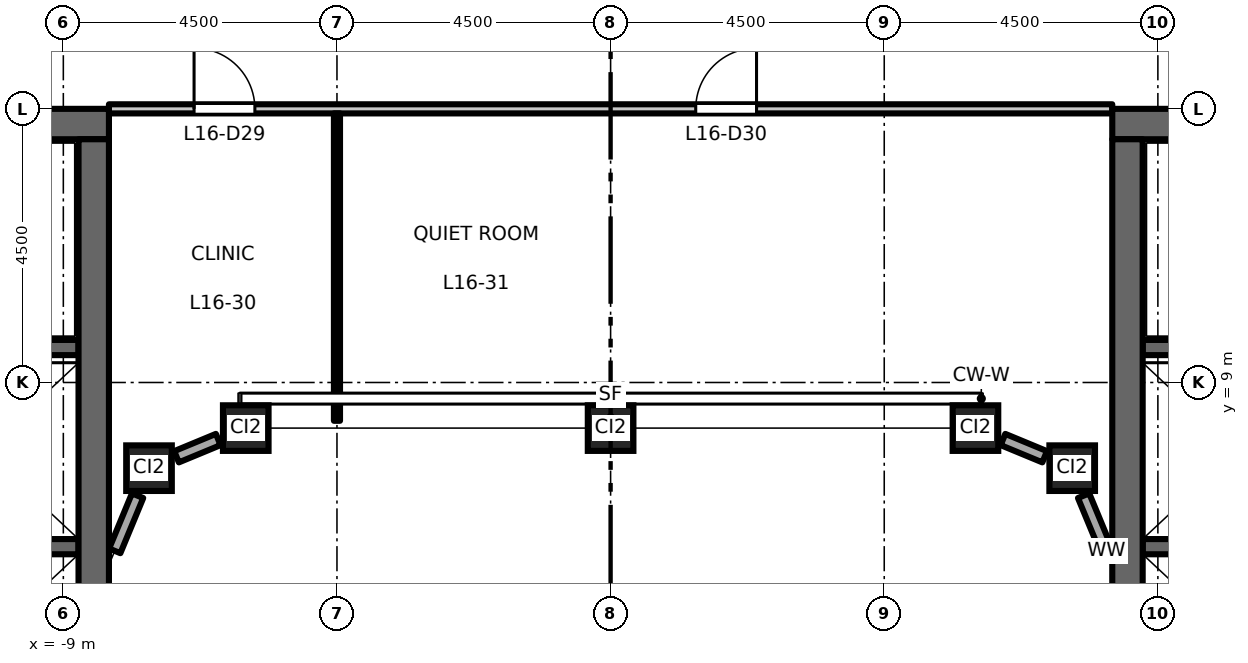
"""IFC4 building model, lengths in metres.
Left out: names, types, materials, properties, quantities, classifications, styles, units other than length and angle.
Written with IfcOpenShell. Run it as: python <this file> out.ifc"""

import sys

from ifc_helpers import new_model, si_unit, direction, frame, frame_2d, origin, origin_2d, place, context, subcontext, project, spatial, rectangle, hollow_rectangle, extrude, element, fill, save


model = new_model("IFC4")
c1 = context("Model", 3, precision=1e-05, world=origin(), true_north=direction((0.0, 1.0)))
c2 = subcontext(c1, "Body", "Model", "MODEL_VIEW")
j1 = project(units=[si_unit("LENGTHUNIT", "METRE"), si_unit("PLANEANGLEUNIT", "RADIAN")], contexts=[c1])
p1 = place(None, origin())
s1 = spatial("IfcSite", under=j1, at=p1, CompositionType="ELEMENT")
p2 = place(p1, origin())
s2 = spatial("IfcBuilding", under=s1, at=p2, CompositionType="ELEMENT")
p3 = place(p2, frame((0.0, 0.0, 76.2)))
s3 = spatial("IfcBuildingStorey", under=s2, at=p3, CompositionType="ELEMENT", Elevation=76.2)
for number, where, z_axis, x_axis in (
    (1, (-7.591, 7.591, 0.0), (0.0, 0.0, 1.0), (1.0, 0.0, 0.0)),
    (2, (-6.0, 8.25, 0.0), (0.0, 0.0, 1.0), (1.0, 0.0, 0.0)),
    (3, (0.0, 8.25, 0.0), (0.0, 0.0, 1.0), (1.0, 0.0, 0.0)),
    (4, (6.0, 8.25, 0.0), (0.0, 0.0, 1.0), (1.0, 0.0, 0.0)),
    (5, (7.591, 7.591, 0.0), (0.0, 0.0, 1.0), (1.0, 0.0, 0.0)),
):
    element("IfcColumn", number, at=place(p3, frame(where, z_axis=z_axis, x_axis=x_axis)), inside=s3, PredefinedType="COLUMN", context=c2, shape_type="SweptSolid", body=[
        extrude(hollow_rectangle(XDim=0.75, YDim=0.75, WallThickness=0.045, at=origin_2d()), origin(), (0.0, 0.0, 1.0), 4.5),
    ])
p4 = place(p3, frame((-8.75, 6.3, 0.0), z_axis=(0.0, 0.0, 1.0), x_axis=(-1.0, 0.0, 0.0)))
e6 = element("IfcWall", 6, at=p4, inside=s3, PredefinedType="SHEAR", context=c2, shape_type="SweptSolid", body=[
    extrude(rectangle(XDim=3.1, YDim=0.25, at=frame_2d((1.55, 0.0))), origin(), (0.0, 0.0, 1.0), 4.35),
])
p5 = place(p3, frame((-8.75, 9.575, 0.0), z_axis=(0.0, 0.0, 1.0), x_axis=(-1.0, 0.0, 0.0)))
e7 = element("IfcWall", 7, at=p5, inside=s3, PredefinedType="SHEAR", context=c2, shape_type="SweptSolid", body=[
    extrude(rectangle(XDim=8.0, YDim=0.25, at=frame_2d((4.0, 0.0))), origin(), (0.0, 0.0, 1.0), 4.35),
])
p6 = place(p5, frame((6.65, 0.0, 0.0)))
e8 = element("IfcOpeningElement", 8, at=p6, cuts=e7, PredefinedType="OPENING", context=c2, shape_type="SweptSolid", body=[
    extrude(rectangle(XDim=1.1, YDim=2.1, at=frame_2d((0.55, 1.05))), frame((0.0, 0.135, 0.0), z_axis=(0.0, -1.0, 0.0), x_axis=(1.0, 0.0, 0.0)), (0.0, 0.0, 1.0), 0.27),
])
p7 = place(p3, frame((-8.25, 13.25, 0.0), z_axis=(0.0, 0.0, 1.0), x_axis=(-1.0, 0.0, 0.0)))
e9 = element("IfcWall", 9, at=p7, inside=s3, PredefinedType="SHEAR", context=c2, shape_type="SweptSolid", body=[
    extrude(rectangle(XDim=13.5, YDim=0.5, at=frame_2d((6.75, 0.0))), origin(), (0.0, 0.0, 1.0), 4.35),
])
p8 = place(p3, frame((-8.5, -13.0, 0.0), z_axis=(0.0, 0.0, 1.0), x_axis=(0.0, 1.0, 0.0)))
e10 = element("IfcWall", 10, at=p8, inside=s3, PredefinedType="SHEAR", context=c2, shape_type="SweptSolid", body=[
    extrude(rectangle(XDim=26.0, YDim=0.5, at=frame_2d((13.0, 0.0))), origin(), (0.0, 0.0, 1.0), 4.35),
])
p9 = place(p3, frame((8.75, 6.3, 0.0), z_axis=(0.0, 0.0, 1.0), x_axis=(1.0, 0.0, 0.0)))
e11 = element("IfcWall", 11, at=p9, inside=s3, PredefinedType="SHEAR", context=c2, shape_type="SweptSolid", body=[
    extrude(rectangle(XDim=3.1, YDim=0.25, at=frame_2d((1.55, 0.0))), origin(), (0.0, 0.0, 1.0), 4.35),
])
p10 = place(p3, frame((8.75, 9.575, 0.0), z_axis=(0.0, 0.0, 1.0), x_axis=(1.0, 0.0, 0.0)))
e12 = element("IfcWall", 12, at=p10, inside=s3, PredefinedType="SHEAR", context=c2, shape_type="SweptSolid", body=[
    extrude(rectangle(XDim=8.0, YDim=0.25, at=frame_2d((4.0, 0.0))), origin(), (0.0, 0.0, 1.0), 4.35),
])
p11 = place(p10, frame((6.65, 0.0, 0.0)))
e13 = element("IfcOpeningElement", 13, at=p11, cuts=e12, PredefinedType="OPENING", context=c2, shape_type="SweptSolid", body=[
    extrude(rectangle(XDim=1.1, YDim=2.1, at=frame_2d((0.55, 1.05))), frame((0.0, 0.135, 0.0), z_axis=(0.0, -1.0, 0.0), x_axis=(1.0, 0.0, 0.0)), (0.0, 0.0, 1.0), 0.27),
])
p12 = place(p3, frame((8.25, 13.25, 0.0), z_axis=(0.0, 0.0, 1.0), x_axis=(1.0, 0.0, 0.0)))
e14 = element("IfcWall", 14, at=p12, inside=s3, PredefinedType="SHEAR", context=c2, shape_type="SweptSolid", body=[
    extrude(rectangle(XDim=13.5, YDim=0.5, at=frame_2d((6.75, 0.0))), origin(), (0.0, 0.0, 1.0), 4.35),
])
p13 = place(p3, frame((8.5, -13.0, 0.0), z_axis=(0.0, 0.0, 1.0), x_axis=(0.0, 1.0, 0.0)))
e15 = element("IfcWall", 15, at=p13, inside=s3, PredefinedType="SHEAR", context=c2, shape_type="SweptSolid", body=[
    extrude(rectangle(XDim=26.0, YDim=0.5, at=frame_2d((13.0, 0.0))), origin(), (0.0, 0.0, 1.0), 4.35),
])
p14 = place(p3, frame((8.154, 6.231, 0.0), z_axis=(0.0, 0.0, 1.0), x_axis=(-0.382549378284, 0.923935048136, 0.0)))
e16 = element("IfcWall", 16, at=p14, inside=s3, PredefinedType="STANDARD", context=c2, shape_type="SweptSolid", body=[
    extrude(rectangle(XDim=0.982, YDim=0.2, at=frame_2d((0.491, 0.0))), origin(), (0.0, 0.0, 1.0), 3.73),
])
for number, where, z_axis, x_axis in (
    (17, (7.138, 7.779, 0.0), (0.0, 0.0, 1.0), (-0.924, 0.383, 0.0)),
    (18, (-6.453, 8.062, 0.0), (0.0, 0.0, 1.0), (-0.924, -0.383, 0.0)),
):
    element("IfcWall", number, at=place(p3, frame(where, z_axis=z_axis, x_axis=x_axis)), inside=s3, PredefinedType="STANDARD", context=c2, shape_type="SweptSolid", body=[
        extrude(rectangle(XDim=0.742, YDim=0.2, at=frame_2d((0.371, 0.0))), origin(), (0.0, 0.0, 1.0), 3.73),
    ])
p15 = place(p3, frame((-7.779, 7.138, 0.0), z_axis=(0.0, 0.0, 1.0), x_axis=(-0.382549378284, -0.923935048136, 0.0)))
e19 = element("IfcWall", 19, at=p15, inside=s3, PredefinedType="STANDARD", context=c2, shape_type="SweptSolid", body=[
    extrude(rectangle(XDim=0.982, YDim=0.2, at=frame_2d((0.491, 0.0))), origin(), (0.0, 0.0, 1.0), 3.73),
])
p16 = place(p3, frame((-8.25, 13.5, 0.0), z_axis=(0.0, 0.0, 1.0), x_axis=(1.0, 0.0, 0.0)))
e20 = element("IfcWall", 20, at=p16, inside=s3, PredefinedType="PARTITIONING", context=c2, shape_type="SweptSolid", body=[
    extrude(rectangle(XDim=16.5, YDim=0.15, at=frame_2d((8.25, 0.0))), origin(), (0.0, 0.0, 1.0), 3.85),
])
p17 = place(p16, frame((1.4, 0.0, 0.0)))
e21 = element("IfcOpeningElement", 21, at=p17, cuts=e20, PredefinedType="OPENING", context=c2, shape_type="SweptSolid", body=[
    extrude(rectangle(XDim=1.0, YDim=2.1, at=frame_2d((0.5, 1.05))), frame((0.0, 0.085, 0.0), z_axis=(0.0, -1.0, 0.0), x_axis=(1.0, 0.0, 0.0)), (0.0, 0.0, 1.0), 0.17),
])
p18 = place(p16, frame((9.65, 0.0, 0.0)))
e22 = element("IfcOpeningElement", 22, at=p18, cuts=e20, PredefinedType="OPENING", context=c2, shape_type="SweptSolid", body=[
    extrude(rectangle(XDim=1.0, YDim=2.1, at=frame_2d((0.5, 1.05))), frame((0.0, 0.085, 0.0), z_axis=(0.0, -1.0, 0.0), x_axis=(1.0, 0.0, 0.0)), (0.0, 0.0, 1.0), 0.17),
])
p19 = place(p3, frame((-4.5, 8.37, 0.0), z_axis=(0.0, 0.0, 1.0), x_axis=(0.0, 1.0, 0.0)))
e23 = element("IfcWall", 23, at=p19, inside=s3, PredefinedType="PARTITIONING", context=c2, shape_type="SweptSolid", body=[
    extrude(rectangle(XDim=5.055, YDim=0.1, at=frame_2d((2.527, 0.0))), origin(), (0.0, 0.0, 1.0), 3.35),
])
p20 = place(p17, origin())
e24 = element("IfcDoor", 24, at=p20, inside=s3, OperationType="SINGLE_SWING_LEFT", PredefinedType="DOOR", context=c2, shape_type="SweptSolid", body=[
    extrude(rectangle(XDim=1.0, YDim=2.1, at=frame_2d((0.5, 1.05))), frame((0.0, 0.025, 0.0), z_axis=(0.0, -1.0, 0.0), x_axis=(1.0, 0.0, 0.0)), (0.0, 0.0, 1.0), 0.05),
])
fill(e21, e24)
p21 = place(p18, origin())
e25 = element("IfcDoor", 25, at=p21, inside=s3, OperationType="SINGLE_SWING_RIGHT", PredefinedType="DOOR", context=c2, shape_type="SweptSolid", body=[
    extrude(rectangle(XDim=1.0, YDim=2.1, at=frame_2d((0.5, 1.05))), frame((0.0, 0.025, 0.0), z_axis=(0.0, -1.0, 0.0), x_axis=(1.0, 0.0, 0.0)), (0.0, 0.0, 1.0), 0.05),
])
fill(e22, e25)
save(model, sys.argv[1])
